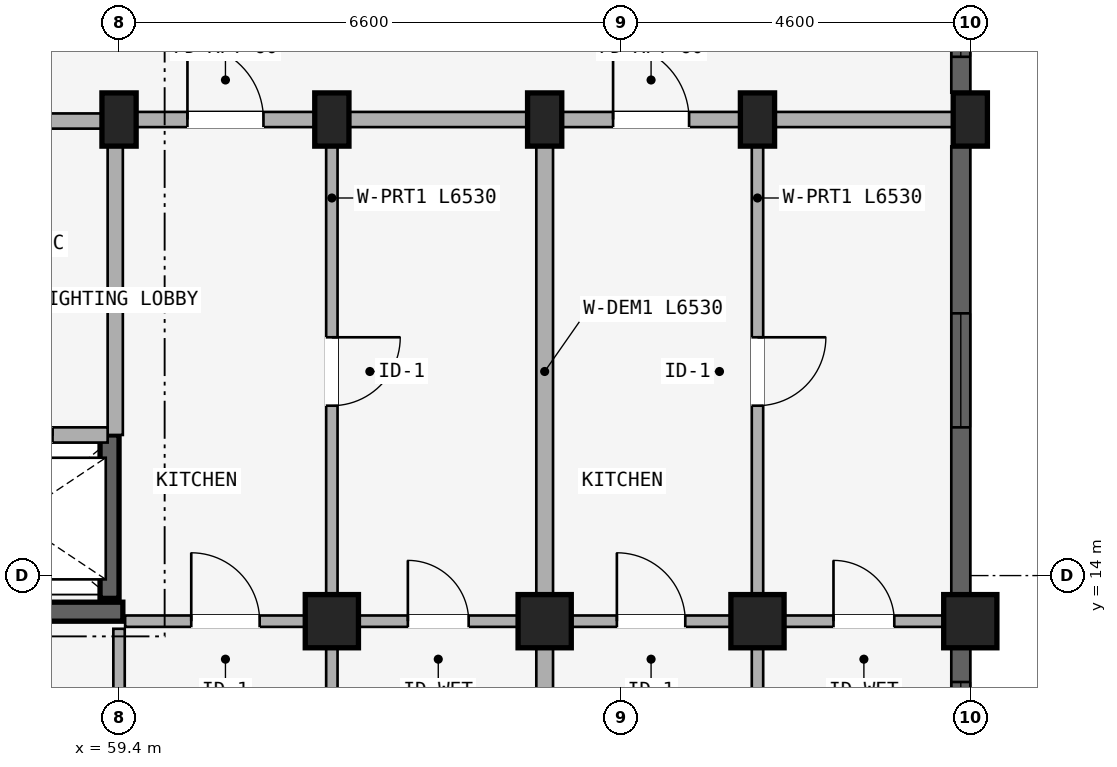
"""IFC4 building model, lengths in metres.
Left out: names, types, materials, properties, quantities, classifications, styles, units other than length and angle.
Written with IfcOpenShell. Run it as: python <this file> out.ifc"""

import sys

from ifc_helpers import new_model, si_unit, direction, frame, frame_2d, origin, origin_2d, place, context, subcontext, project, spatial, rectangle, extrude, element, fill, save


model = new_model("IFC4")
c1 = context("Model", 3, precision=1e-05, world=origin(), true_north=direction((0.0, 1.0)))
c2 = subcontext(c1, "Body", "Model", "MODEL_VIEW")
j1 = project(units=[si_unit("LENGTHUNIT", "METRE"), si_unit("PLANEANGLEUNIT", "RADIAN")], contexts=[c1])
p1 = place(None, origin())
s1 = spatial("IfcSite", under=j1, at=p1, CompositionType="ELEMENT")
p2 = place(p1, origin())
s2 = spatial("IfcBuilding", under=s1, at=p2, CompositionType="ELEMENT")
p3 = place(p2, frame((0.0, 0.0, 18.15)))
s3 = spatial("IfcBuildingStorey", under=s2, at=p3, CompositionType="ELEMENT", Elevation=18.15)
p4 = place(p3, frame((56.65, 13.525, 0.0), z_axis=(0.0, 0.0, 1.0), x_axis=(1.0, 0.0, 0.0)))
e1 = element("IfcWall", 1, at=p4, inside=s3, PredefinedType="SHEAR", context=c2, shape_type="SweptSolid", body=[
    extrude(rectangle(XDim=2.8, YDim=0.25, at=frame_2d((1.4, 0.0))), origin(), (0.0, 0.0, 1.0), 2.93),
])
p5 = place(p3, frame((59.275, 15.85, 0.0), z_axis=(0.0, 0.0, 1.0), x_axis=(0.0, -1.0, 0.0)))
e2 = element("IfcWall", 2, at=p5, inside=s3, PredefinedType="SHEAR", context=c2, shape_type="SweptSolid", body=[
    extrude(rectangle(XDim=2.15, YDim=0.25, at=frame_2d((1.075, 0.0))), origin(), (0.0, 0.0, 1.0), 2.93),
])
for number, where, z_axis, x_axis in (
    (3, (59.4, 20.0, 0.0), (0.0, 0.0, 1.0), (1.0, 0.0, 0.0)),
    (4, (62.2, 20.0, 0.0), (0.0, 0.0, 1.0), (1.0, 0.0, 0.0)),
):
    element("IfcColumn", number, at=place(p3, frame(where, z_axis=z_axis, x_axis=x_axis)), inside=s3, PredefinedType="COLUMN", context=c2, shape_type="SweptSolid", body=[
        extrude(rectangle(XDim=0.45, YDim=0.7, at=origin_2d()), origin(), (0.0, 0.0, 1.0), 2.93),
    ])
p6 = place(p3, frame((62.2, 13.4, 0.0), z_axis=(0.0, 0.0, 1.0), x_axis=(1.0, 0.0, 0.0)))
e5 = element("IfcColumn", 5, at=p6, inside=s3, PredefinedType="COLUMN", context=c2, shape_type="SweptSolid", body=[
    extrude(rectangle(XDim=0.7, YDim=0.7, at=origin_2d()), origin(), (0.0, 0.0, 1.0), 2.93),
])
p7 = place(p3, frame((65.0, 20.0, 0.0), z_axis=(0.0, 0.0, 1.0), x_axis=(1.0, 0.0, 0.0)))
e6 = element("IfcColumn", 6, at=p7, inside=s3, PredefinedType="COLUMN", context=c2, shape_type="SweptSolid", body=[
    extrude(rectangle(XDim=0.45, YDim=0.7, at=origin_2d()), origin(), (0.0, 0.0, 1.0), 2.93),
])
p8 = place(p3, frame((65.0, 13.4, 0.0), z_axis=(0.0, 0.0, 1.0), x_axis=(1.0, 0.0, 0.0)))
e7 = element("IfcColumn", 7, at=p8, inside=s3, PredefinedType="COLUMN", context=c2, shape_type="SweptSolid", body=[
    extrude(rectangle(XDim=0.7, YDim=0.7, at=origin_2d()), origin(), (0.0, 0.0, 1.0), 2.93),
])
p9 = place(p3, frame((67.8, 20.0, 0.0), z_axis=(0.0, 0.0, 1.0), x_axis=(1.0, 0.0, 0.0)))
e8 = element("IfcColumn", 8, at=p9, inside=s3, PredefinedType="COLUMN", context=c2, shape_type="SweptSolid", body=[
    extrude(rectangle(XDim=0.45, YDim=0.7, at=origin_2d()), origin(), (0.0, 0.0, 1.0), 2.93),
])
p10 = place(p3, frame((67.8, 13.4, 0.0), z_axis=(0.0, 0.0, 1.0), x_axis=(1.0, 0.0, 0.0)))
e9 = element("IfcColumn", 9, at=p10, inside=s3, PredefinedType="COLUMN", context=c2, shape_type="SweptSolid", body=[
    extrude(rectangle(XDim=0.7, YDim=0.7, at=origin_2d()), origin(), (0.0, 0.0, 1.0), 2.93),
])
p11 = place(p3, frame((70.6, 20.0, 0.0), z_axis=(0.0, 0.0, 1.0), x_axis=(1.0, 0.0, 0.0)))
e10 = element("IfcColumn", 10, at=p11, inside=s3, PredefinedType="COLUMN", context=c2, shape_type="SweptSolid", body=[
    extrude(rectangle(XDim=0.45, YDim=0.7, at=origin_2d()), origin(), (0.0, 0.0, 1.0), 2.93),
])
p12 = place(p3, frame((70.6, 13.4, 0.0), z_axis=(0.0, 0.0, 1.0), x_axis=(1.0, 0.0, 0.0)))
e11 = element("IfcColumn", 11, at=p12, inside=s3, PredefinedType="COLUMN", context=c2, shape_type="SweptSolid", body=[
    extrude(rectangle(XDim=0.7, YDim=0.7, at=origin_2d()), origin(), (0.0, 0.0, 1.0), 2.93),
])
p13 = place(p3, frame((53.7, 19.98, 0.0), z_axis=(0.0, 0.0, 1.0), x_axis=(1.0, 0.0, 0.0)))
e12 = element("IfcWall", 12, at=p13, inside=s3, PredefinedType="STANDARD", context=c2, shape_type="SweptSolid", body=[
    extrude(rectangle(XDim=5.65, YDim=0.2, at=frame_2d((2.825, 0.0))), origin(), (0.0, 0.0, 1.0), 2.372),
])
p14 = place(p13, frame((1.923, 0.0, 0.0)))
e13 = element("IfcOpeningElement", 13, at=p14, cuts=e12, PredefinedType="OPENING", context=c2, shape_type="SweptSolid", body=[
    extrude(rectangle(XDim=1.24, YDim=2.15, at=frame_2d((0.62, 1.075))), frame((0.0, 0.11, 0.0), z_axis=(0.0, -1.0, 0.0), x_axis=(1.0, 0.0, 0.0)), (0.0, 0.0, 1.0), 0.22),
])
p15 = place(p3, frame((59.35, 19.98, 0.0), z_axis=(0.0, 0.0, 1.0), x_axis=(0.0, -1.0, 0.0)))
e14 = element("IfcWall", 14, at=p15, inside=s3, PredefinedType="STANDARD", context=c2, shape_type="SweptSolid", body=[
    extrude(rectangle(XDim=4.13, YDim=0.2, at=frame_2d((2.065, 0.0))), origin(), (0.0, 0.0, 1.0), 2.372),
])
p16 = place(p3, frame((56.7, 15.85, 0.0), z_axis=(0.0, 0.0, 1.0), x_axis=(1.0, 0.0, 0.0)))
e15 = element("IfcWall", 15, at=p16, inside=s3, PredefinedType="STANDARD", context=c2, shape_type="SweptSolid", body=[
    extrude(rectangle(XDim=2.55, YDim=0.2, at=frame_2d((1.275, 0.0))), origin(), (0.0, 0.0, 1.0), 2.372),
])
p17 = place(p16, frame((0.725, 0.0, 0.0)))
e16 = element("IfcOpeningElement", 16, at=p17, cuts=e15, PredefinedType="OPENING", context=c2, shape_type="SweptSolid", body=[
    extrude(rectangle(XDim=1.1, YDim=2.15, at=frame_2d((0.55, 1.075))), frame((0.0, 0.11, 0.0), z_axis=(0.0, -1.0, 0.0), x_axis=(1.0, 0.0, 0.0)), (0.0, 0.0, 1.0), 0.22),
])
p18 = place(p3, frame((59.4, 20.0, 0.0), z_axis=(0.0, 0.0, 1.0), x_axis=(1.0, 0.0, 0.0)))
e17 = element("IfcWall", 17, at=p18, inside=s3, PredefinedType="STANDARD", context=c2, shape_type="SweptSolid", body=[
    extrude(rectangle(XDim=2.8, YDim=0.2, at=frame_2d((1.4, 0.0))), origin(), (0.0, 0.0, 1.0), 2.372),
])
p19 = place(p18, frame((0.9, 0.0, 0.0)))
e18 = element("IfcOpeningElement", 18, at=p19, cuts=e17, PredefinedType="OPENING", context=c2, shape_type="SweptSolid", body=[
    extrude(rectangle(XDim=1.0, YDim=2.15, at=frame_2d((0.5, 1.075))), frame((0.0, 0.11, 0.0), z_axis=(0.0, -1.0, 0.0), x_axis=(1.0, 0.0, 0.0)), (0.0, 0.0, 1.0), 0.22),
])
p20 = place(p3, frame((59.48, 13.4, 0.0), z_axis=(0.0, 0.0, 1.0), x_axis=(1.0, 0.0, 0.0)))
e19 = element("IfcWall", 19, at=p20, inside=s3, PredefinedType="PLUMBINGWALL", context=c2, shape_type="SweptSolid", body=[
    extrude(rectangle(XDim=2.64, YDim=0.15, at=frame_2d((1.32, 0.0))), origin(), (0.0, 0.0, 1.0), 2.372),
])
p21 = place(p20, frame((0.87, 0.0, 0.0)))
e20 = element("IfcOpeningElement", 20, at=p21, cuts=e19, PredefinedType="OPENING", context=c2, shape_type="SweptSolid", body=[
    extrude(rectangle(XDim=0.9, YDim=2.1, at=frame_2d((0.45, 1.05))), frame((0.0, 0.085, 0.0), z_axis=(0.0, -1.0, 0.0), x_axis=(1.0, 0.0, 0.0)), (0.0, 0.0, 1.0), 0.17),
])
p22 = place(p3, frame((62.2, 20.0, 0.0), z_axis=(0.0, 0.0, 1.0), x_axis=(1.0, 0.0, 0.0)))
e21 = element("IfcWall", 21, at=p22, inside=s3, PredefinedType="STANDARD", context=c2, shape_type="SweptSolid", body=[
    extrude(rectangle(XDim=2.8, YDim=0.2, at=frame_2d((1.4, 0.0))), origin(), (0.0, 0.0, 1.0), 2.372),
])
p23 = place(p3, frame((62.28, 13.4, 0.0), z_axis=(0.0, 0.0, 1.0), x_axis=(1.0, 0.0, 0.0)))
e22 = element("IfcWall", 22, at=p23, inside=s3, PredefinedType="PLUMBINGWALL", context=c2, shape_type="SweptSolid", body=[
    extrude(rectangle(XDim=2.64, YDim=0.15, at=frame_2d((1.32, 0.0))), origin(), (0.0, 0.0, 1.0), 2.372),
])
p24 = place(p23, frame((0.92, 0.0, 0.0)))
e23 = element("IfcOpeningElement", 23, at=p24, cuts=e22, PredefinedType="OPENING", context=c2, shape_type="SweptSolid", body=[
    extrude(rectangle(XDim=0.8, YDim=2.1, at=frame_2d((0.4, 1.05))), frame((0.0, 0.085, 0.0), z_axis=(0.0, -1.0, 0.0), x_axis=(1.0, 0.0, 0.0)), (0.0, 0.0, 1.0), 0.17),
])
p25 = place(p3, frame((65.0, 20.0, 0.0), z_axis=(0.0, 0.0, 1.0), x_axis=(1.0, 0.0, 0.0)))
e24 = element("IfcWall", 24, at=p25, inside=s3, PredefinedType="STANDARD", context=c2, shape_type="SweptSolid", body=[
    extrude(rectangle(XDim=2.8, YDim=0.2, at=frame_2d((1.4, 0.0))), origin(), (0.0, 0.0, 1.0), 2.372),
])
p26 = place(p25, frame((0.9, 0.0, 0.0)))
e25 = element("IfcOpeningElement", 25, at=p26, cuts=e24, PredefinedType="OPENING", context=c2, shape_type="SweptSolid", body=[
    extrude(rectangle(XDim=1.0, YDim=2.15, at=frame_2d((0.5, 1.075))), frame((0.0, 0.11, 0.0), z_axis=(0.0, -1.0, 0.0), x_axis=(1.0, 0.0, 0.0)), (0.0, 0.0, 1.0), 0.22),
])
p27 = place(p3, frame((65.08, 13.4, 0.0), z_axis=(0.0, 0.0, 1.0), x_axis=(1.0, 0.0, 0.0)))
e26 = element("IfcWall", 26, at=p27, inside=s3, PredefinedType="PLUMBINGWALL", context=c2, shape_type="SweptSolid", body=[
    extrude(rectangle(XDim=2.64, YDim=0.15, at=frame_2d((1.32, 0.0))), origin(), (0.0, 0.0, 1.0), 2.372),
])
p28 = place(p27, frame((0.87, 0.0, 0.0)))
e27 = element("IfcOpeningElement", 27, at=p28, cuts=e26, PredefinedType="OPENING", context=c2, shape_type="SweptSolid", body=[
    extrude(rectangle(XDim=0.9, YDim=2.1, at=frame_2d((0.45, 1.05))), frame((0.0, 0.085, 0.0), z_axis=(0.0, -1.0, 0.0), x_axis=(1.0, 0.0, 0.0)), (0.0, 0.0, 1.0), 0.17),
])
p29 = place(p3, frame((67.8, 20.0, 0.0), z_axis=(0.0, 0.0, 1.0), x_axis=(1.0, 0.0, 0.0)))
e28 = element("IfcWall", 28, at=p29, inside=s3, PredefinedType="STANDARD", context=c2, shape_type="SweptSolid", body=[
    extrude(rectangle(XDim=2.8, YDim=0.2, at=frame_2d((1.4, 0.0))), origin(), (0.0, 0.0, 1.0), 2.372),
])
p30 = place(p3, frame((67.88, 13.4, 0.0), z_axis=(0.0, 0.0, 1.0), x_axis=(1.0, 0.0, 0.0)))
e29 = element("IfcWall", 29, at=p30, inside=s3, PredefinedType="PLUMBINGWALL", context=c2, shape_type="SweptSolid", body=[
    extrude(rectangle(XDim=2.64, YDim=0.15, at=frame_2d((1.32, 0.0))), origin(), (0.0, 0.0, 1.0), 2.372),
])
p31 = place(p30, frame((0.92, 0.0, 0.0)))
e30 = element("IfcOpeningElement", 30, at=p31, cuts=e29, PredefinedType="OPENING", context=c2, shape_type="SweptSolid", body=[
    extrude(rectangle(XDim=0.8, YDim=2.1, at=frame_2d((0.4, 1.05))), frame((0.0, 0.085, 0.0), z_axis=(0.0, -1.0, 0.0), x_axis=(1.0, 0.0, 0.0)), (0.0, 0.0, 1.0), 0.17),
])
p32 = place(p3, frame((59.4, 13.3, 0.0), z_axis=(0.0, 0.0, 1.0), x_axis=(0.0, -1.0, 0.0)))
e31 = element("IfcWall", 31, at=p32, inside=s3, PredefinedType="PARTITIONING", context=c2, shape_type="SweptSolid", body=[
    extrude(rectangle(XDim=10.82, YDim=0.15, at=frame_2d((5.41, 0.0))), origin(), (0.0, 0.0, 1.0), 2.372),
])
p33 = place(p32, frame((0.899, 0.0, 0.0)))
e32 = element("IfcOpeningElement", 32, at=p33, cuts=e31, PredefinedType="OPENING", context=c2, shape_type="SweptSolid", body=[
    extrude(rectangle(XDim=0.8, YDim=2.1, at=frame_2d((0.4, 1.05))), frame((0.0, 0.085, 0.0), z_axis=(0.0, -1.0, 0.0), x_axis=(1.0, 0.0, 0.0)), (0.0, 0.0, 1.0), 0.17),
])
p34 = place(p3, frame((62.2, 19.95, 0.0), z_axis=(0.0, 0.0, 1.0), x_axis=(0.0, -1.0, 0.0)))
e33 = element("IfcWall", 33, at=p34, inside=s3, PredefinedType="PARTITIONING", context=c2, shape_type="SweptSolid", body=[
    extrude(rectangle(XDim=6.53, YDim=0.15, at=frame_2d((3.265, 0.0))), origin(), (0.0, 0.0, 1.0), 2.372),
])
p35 = place(p34, frame((2.815, 0.0, 0.0)))
e34 = element("IfcOpeningElement", 34, at=p35, cuts=e33, PredefinedType="OPENING", context=c2, shape_type="SweptSolid", body=[
    extrude(rectangle(XDim=0.9, YDim=2.1, at=frame_2d((0.45, 1.05))), frame((0.0, 0.085, 0.0), z_axis=(0.0, -1.0, 0.0), x_axis=(1.0, 0.0, 0.0)), (0.0, 0.0, 1.0), 0.17),
])
p36 = place(p3, frame((62.2, 13.3, 0.0), z_axis=(0.0, 0.0, 1.0), x_axis=(0.0, -1.0, 0.0)))
e35 = element("IfcWall", 35, at=p36, inside=s3, PredefinedType="PARTITIONING", context=c2, shape_type="SweptSolid", body=[
    extrude(rectangle(XDim=10.82, YDim=0.15, at=frame_2d((5.41, 0.0))), origin(), (0.0, 0.0, 1.0), 2.372),
])
p37 = place(p36, frame((0.899, 0.0, 0.0)))
e36 = element("IfcOpeningElement", 36, at=p37, cuts=e35, PredefinedType="OPENING", context=c2, shape_type="SweptSolid", body=[
    extrude(rectangle(XDim=0.8, YDim=2.1, at=frame_2d((0.4, 1.05))), frame((0.0, 0.085, 0.0), z_axis=(0.0, -1.0, 0.0), x_axis=(1.0, 0.0, 0.0)), (0.0, 0.0, 1.0), 0.17),
])
p38 = place(p3, frame((65.0, 19.95, 0.0), z_axis=(0.0, 0.0, 1.0), x_axis=(0.0, -1.0, 0.0)))
e37 = element("IfcWall", 37, at=p38, inside=s3, PredefinedType="STANDARD", context=c2, shape_type="SweptSolid", body=[
    extrude(rectangle(XDim=6.53, YDim=0.22, at=frame_2d((3.265, 0.0))), origin(), (0.0, 0.0, 1.0), 2.372),
])
p39 = place(p3, frame((65.0, 13.3, 0.0), z_axis=(0.0, 0.0, 1.0), x_axis=(0.0, -1.0, 0.0)))
e38 = element("IfcWall", 38, at=p39, inside=s3, PredefinedType="STANDARD", context=c2, shape_type="SweptSolid", body=[
    extrude(rectangle(XDim=10.82, YDim=0.22, at=frame_2d((5.41, 0.0))), origin(), (0.0, 0.0, 1.0), 2.372),
])
p40 = place(p3, frame((67.8, 19.95, 0.0), z_axis=(0.0, 0.0, 1.0), x_axis=(0.0, -1.0, 0.0)))
e39 = element("IfcWall", 39, at=p40, inside=s3, PredefinedType="PARTITIONING", context=c2, shape_type="SweptSolid", body=[
    extrude(rectangle(XDim=6.53, YDim=0.15, at=frame_2d((3.265, 0.0))), origin(), (0.0, 0.0, 1.0), 2.372),
])
p41 = place(p40, frame((2.815, 0.0, 0.0)))
e40 = element("IfcOpeningElement", 40, at=p41, cuts=e39, PredefinedType="OPENING", context=c2, shape_type="SweptSolid", body=[
    extrude(rectangle(XDim=0.9, YDim=2.1, at=frame_2d((0.45, 1.05))), frame((0.0, 0.085, 0.0), z_axis=(0.0, -1.0, 0.0), x_axis=(1.0, 0.0, 0.0)), (0.0, 0.0, 1.0), 0.17),
])
p42 = place(p3, frame((67.8, 13.3, 0.0), z_axis=(0.0, 0.0, 1.0), x_axis=(0.0, -1.0, 0.0)))
e41 = element("IfcWall", 41, at=p42, inside=s3, PredefinedType="PARTITIONING", context=c2, shape_type="SweptSolid", body=[
    extrude(rectangle(XDim=10.82, YDim=0.15, at=frame_2d((5.41, 0.0))), origin(), (0.0, 0.0, 1.0), 2.372),
])
p43 = place(p42, frame((0.899, 0.0, 0.0)))
e42 = element("IfcOpeningElement", 42, at=p43, cuts=e41, PredefinedType="OPENING", context=c2, shape_type="SweptSolid", body=[
    extrude(rectangle(XDim=0.8, YDim=2.1, at=frame_2d((0.4, 1.05))), frame((0.0, 0.085, 0.0), z_axis=(0.0, -1.0, 0.0), x_axis=(1.0, 0.0, 0.0)), (0.0, 0.0, 1.0), 0.17),
])
p44 = place(p3, frame((70.475, 22.046, 0.0), z_axis=(0.0, 0.0, 1.0), x_axis=(0.0, -1.0, 0.0)))
e43 = element("IfcWall", 43, at=p44, inside=s3, PredefinedType="STANDARD", context=c2, shape_type="SweptSolid", body=[
    extrude(rectangle(XDim=1.693, YDim=0.25, at=frame_2d((0.846, 0.0))), origin(), (0.0, 0.0, 1.0), 2.372),
])
p45 = place(p44, frame((0.471, 0.0, 0.88)))
e44 = element("IfcOpeningElement", 44, at=p45, cuts=e43, PredefinedType="OPENING", context=c2, shape_type="SweptSolid", body=[
    extrude(rectangle(XDim=0.75, YDim=1.05, at=frame_2d((0.375, 0.525))), frame((0.0, 0.135, 0.0), z_axis=(0.0, -1.0, 0.0), x_axis=(1.0, 0.0, 0.0)), (0.0, 0.0, 1.0), 0.27),
])
p46 = place(p3, frame((70.475, 19.646, 0.0), z_axis=(0.0, 0.0, 1.0), x_axis=(0.0, -1.0, 0.0)))
e45 = element("IfcWall", 45, at=p46, inside=s3, PredefinedType="STANDARD", context=c2, shape_type="SweptSolid", body=[
    extrude(rectangle(XDim=5.893, YDim=0.25, at=frame_2d((2.947, 0.0))), origin(), (0.0, 0.0, 1.0), 2.372),
])
p47 = place(p46, frame((2.197, 0.0, 0.522)))
e46 = element("IfcOpeningElement", 46, at=p47, cuts=e45, PredefinedType="OPENING", context=c2, shape_type="SweptSolid", body=[
    extrude(rectangle(XDim=1.5, YDim=1.65, at=frame_2d((0.75, 0.825))), frame((0.0, 0.135, 0.0), z_axis=(0.0, -1.0, 0.0), x_axis=(1.0, 0.0, 0.0)), (0.0, 0.0, 1.0), 0.27),
])
p48 = place(p3, frame((70.475, 13.046, 0.0), z_axis=(0.0, 0.0, 1.0), x_axis=(0.0, -1.0, 0.0)))
e47 = element("IfcWall", 47, at=p48, inside=s3, PredefinedType="STANDARD", context=c2, shape_type="SweptSolid", body=[
    extrude(rectangle(XDim=2.093, YDim=0.25, at=frame_2d((1.046, 0.0))), origin(), (0.0, 0.0, 1.0), 2.372),
])
p49 = place(p48, frame((0.447, 0.0, 0.672)))
e48 = element("IfcOpeningElement", 48, at=p49, cuts=e47, PredefinedType="OPENING", context=c2, shape_type="SweptSolid", body=[
    extrude(rectangle(XDim=1.2, YDim=1.5, at=frame_2d((0.6, 0.75))), frame((0.0, 0.135, 0.0), z_axis=(0.0, -1.0, 0.0), x_axis=(1.0, 0.0, 0.0)), (0.0, 0.0, 1.0), 0.27),
])
p50 = place(p45, origin())
e49 = element("IfcWindow", 49, at=p50, inside=s3, PartitioningType="SINGLE_PANEL", PredefinedType="WINDOW", context=c2, shape_type="SweptSolid", body=[
    extrude(rectangle(XDim=0.75, YDim=1.05, at=frame_2d((0.375, 0.525))), frame((0.0, 0.03, 0.0), z_axis=(0.0, -1.0, 0.0), x_axis=(1.0, 0.0, 0.0)), (0.0, 0.0, 1.0), 0.06),
])
fill(e44, e49)
p51 = place(p47, origin())
e50 = element("IfcWindow", 50, at=p51, inside=s3, PartitioningType="DOUBLE_PANEL_VERTICAL", PredefinedType="WINDOW", context=c2, shape_type="SweptSolid", body=[
    extrude(rectangle(XDim=1.5, YDim=1.65, at=frame_2d((0.75, 0.825))), frame((0.0, 0.03, 0.0), z_axis=(0.0, -1.0, 0.0), x_axis=(1.0, 0.0, 0.0)), (0.0, 0.0, 1.0), 0.06),
])
fill(e46, e50)
p52 = place(p49, origin())
e51 = element("IfcWindow", 51, at=p52, inside=s3, PartitioningType="SINGLE_PANEL", PredefinedType="WINDOW", context=c2, shape_type="SweptSolid", body=[
    extrude(rectangle(XDim=1.2, YDim=1.5, at=frame_2d((0.6, 0.75))), frame((0.0, 0.03, 0.0), z_axis=(0.0, -1.0, 0.0), x_axis=(1.0, 0.0, 0.0)), (0.0, 0.0, 1.0), 0.06),
])
fill(e48, e51)
p53 = place(p17, origin())
e52 = element("IfcDoor", 52, at=p53, inside=s3, OperationType="SLIDING_TO_LEFT", PredefinedType="DOOR", context=c2, shape_type="SweptSolid", body=[
    extrude(rectangle(XDim=1.1, YDim=2.15, at=frame_2d((0.55, 1.075))), frame((0.0, 0.025, 0.0), z_axis=(0.0, -1.0, 0.0), x_axis=(1.0, 0.0, 0.0)), (0.0, 0.0, 1.0), 0.05),
])
fill(e16, e52)
p54 = place(p21, origin())
e53 = element("IfcDoor", 53, at=p54, inside=s3, OperationType="SINGLE_SWING_LEFT", PredefinedType="DOOR", context=c2, shape_type="SweptSolid", body=[
    extrude(rectangle(XDim=0.9, YDim=2.1, at=frame_2d((0.45, 1.05))), frame((0.0, 0.025, 0.0), z_axis=(0.0, -1.0, 0.0), x_axis=(1.0, 0.0, 0.0)), (0.0, 0.0, 1.0), 0.05),
])
fill(e20, e53)
p55 = place(p19, frame((1.0, 0.0, 0.0), z_axis=(0.0, 0.0, 1.0), x_axis=(-1.0, 0.0, 0.0)))
e54 = element("IfcDoor", 54, at=p55, inside=s3, OperationType="SINGLE_SWING_RIGHT", PredefinedType="DOOR", context=c2, shape_type="SweptSolid", body=[
    extrude(rectangle(XDim=1.0, YDim=2.15, at=frame_2d((0.5, 1.075))), frame((0.0, 0.025, 0.0), z_axis=(0.0, -1.0, 0.0), x_axis=(1.0, 0.0, 0.0)), (0.0, 0.0, 1.0), 0.05),
])
fill(e18, e54)
p56 = place(p24, origin())
e55 = element("IfcDoor", 55, at=p56, inside=s3, OperationType="SINGLE_SWING_LEFT", PredefinedType="DOOR", context=c2, shape_type="SweptSolid", body=[
    extrude(rectangle(XDim=0.8, YDim=2.1, at=frame_2d((0.4, 1.05))), frame((0.0, 0.025, 0.0), z_axis=(0.0, -1.0, 0.0), x_axis=(1.0, 0.0, 0.0)), (0.0, 0.0, 1.0), 0.05),
])
fill(e23, e55)
p57 = place(p28, origin())
e56 = element("IfcDoor", 56, at=p57, inside=s3, OperationType="SINGLE_SWING_LEFT", PredefinedType="DOOR", context=c2, shape_type="SweptSolid", body=[
    extrude(rectangle(XDim=0.9, YDim=2.1, at=frame_2d((0.45, 1.05))), frame((0.0, 0.025, 0.0), z_axis=(0.0, -1.0, 0.0), x_axis=(1.0, 0.0, 0.0)), (0.0, 0.0, 1.0), 0.05),
])
fill(e27, e56)
p58 = place(p26, frame((1.0, 0.0, 0.0), z_axis=(0.0, 0.0, 1.0), x_axis=(-1.0, 0.0, 0.0)))
e57 = element("IfcDoor", 57, at=p58, inside=s3, OperationType="SINGLE_SWING_RIGHT", PredefinedType="DOOR", context=c2, shape_type="SweptSolid", body=[
    extrude(rectangle(XDim=1.0, YDim=2.15, at=frame_2d((0.5, 1.075))), frame((0.0, 0.025, 0.0), z_axis=(0.0, -1.0, 0.0), x_axis=(1.0, 0.0, 0.0)), (0.0, 0.0, 1.0), 0.05),
])
fill(e25, e57)
p59 = place(p31, origin())
e58 = element("IfcDoor", 58, at=p59, inside=s3, OperationType="SINGLE_SWING_LEFT", PredefinedType="DOOR", context=c2, shape_type="SweptSolid", body=[
    extrude(rectangle(XDim=0.8, YDim=2.1, at=frame_2d((0.4, 1.05))), frame((0.0, 0.025, 0.0), z_axis=(0.0, -1.0, 0.0), x_axis=(1.0, 0.0, 0.0)), (0.0, 0.0, 1.0), 0.05),
])
fill(e30, e58)
p60 = place(p35, frame((0.9, 0.0, 0.0), z_axis=(0.0, 0.0, 1.0), x_axis=(-1.0, 0.0, 0.0)))
e59 = element("IfcDoor", 59, at=p60, inside=s3, OperationType="SINGLE_SWING_RIGHT", PredefinedType="DOOR", context=c2, shape_type="SweptSolid", body=[
    extrude(rectangle(XDim=0.9, YDim=2.1, at=frame_2d((0.45, 1.05))), frame((0.0, 0.025, 0.0), z_axis=(0.0, -1.0, 0.0), x_axis=(1.0, 0.0, 0.0)), (0.0, 0.0, 1.0), 0.05),
])
fill(e34, e59)
p61 = place(p41, origin())
e60 = element("IfcDoor", 60, at=p61, inside=s3, OperationType="SINGLE_SWING_LEFT", PredefinedType="DOOR", context=c2, shape_type="SweptSolid", body=[
    extrude(rectangle(XDim=0.9, YDim=2.1, at=frame_2d((0.45, 1.05))), frame((0.0, 0.025, 0.0), z_axis=(0.0, -1.0, 0.0), x_axis=(1.0, 0.0, 0.0)), (0.0, 0.0, 1.0), 0.05),
])
fill(e40, e60)
save(model, sys.argv[1])
